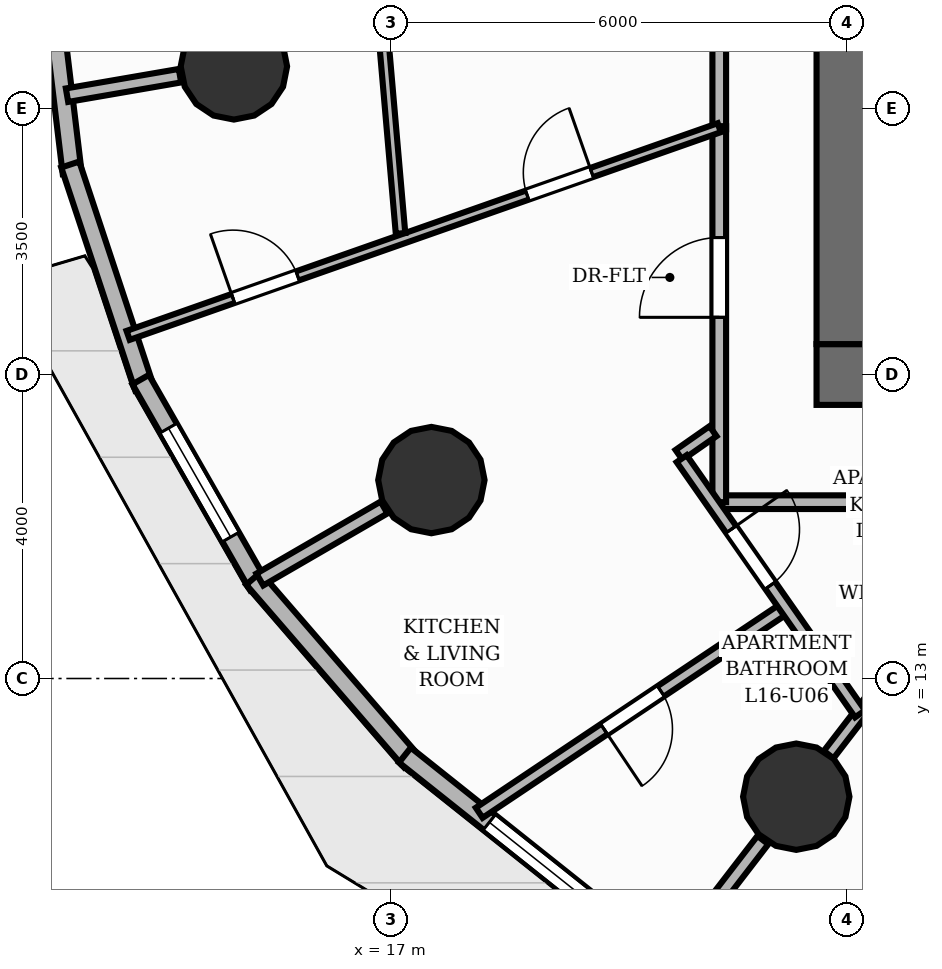
"""IFC4 building model, lengths in metres.
Left out: names, types, materials, properties, quantities, classifications, styles, units other than length and angle.
Written with IfcOpenShell. Run it as: python <this file> out.ifc"""

import sys

from ifc_helpers import new_model, si_unit, direction, frame, frame_2d, origin, origin_2d, place, context, subcontext, project, spatial, rectangle, circle, extrude, element, fill, save


model = new_model("IFC4")
c1 = context("Model", 3, precision=1e-05, world=origin(), true_north=direction((0.0, 1.0)))
c2 = subcontext(c1, "Body", "Model", "MODEL_VIEW")
j1 = project(units=[si_unit("LENGTHUNIT", "METRE"), si_unit("PLANEANGLEUNIT", "RADIAN")], contexts=[c1])
p1 = place(None, origin())
s1 = spatial("IfcSite", under=j1, at=p1, CompositionType="ELEMENT")
p2 = place(p1, origin())
s2 = spatial("IfcBuilding", under=s1, at=p2, CompositionType="ELEMENT")
p3 = place(p2, frame((0.0, 0.0, 56.8)))
s3 = spatial("IfcBuildingStorey", under=s2, at=p3, CompositionType="ELEMENT", Elevation=56.8)
p4 = place(p3, frame((22.6, 17.0, 0.0), z_axis=(0.0, 0.0, 1.0), x_axis=(1.0, 0.0, 0.0)))
e1 = element("IfcWall", 1, at=p4, inside=s3, PredefinedType="SHEAR", context=c2, shape_type="SweptSolid", body=[
    extrude(rectangle(XDim=18.8, YDim=0.8, at=frame_2d((9.4, 0.0))), origin(), (0.0, 0.0, 1.0), 3.2),
])
p5 = place(p4, frame((5.9, 0.0, 0.0)))
e2 = element("IfcOpeningElement", 2, at=p5, cuts=e1, PredefinedType="OPENING", context=c2, shape_type="SweptSolid", body=[
    extrude(rectangle(XDim=1.1, YDim=2.15, at=frame_2d((0.55, 1.075))), frame((0.0, 0.41, 0.0), z_axis=(0.0, -1.0, 0.0), x_axis=(1.0, 0.0, 0.0)), (0.0, 0.0, 1.0), 0.82),
])
p6 = place(p4, frame((9.45, 0.0, 0.0)))
e3 = element("IfcOpeningElement", 3, at=p6, cuts=e1, PredefinedType="OPENING", context=c2, shape_type="SweptSolid", body=[
    extrude(rectangle(XDim=0.9, YDim=2.1, at=frame_2d((0.45, 1.05))), frame((0.0, 0.41, 0.0), z_axis=(0.0, -1.0, 0.0), x_axis=(1.0, 0.0, 0.0)), (0.0, 0.0, 1.0), 0.82),
])
p7 = place(p3, frame((23.0, 17.4, 0.0), z_axis=(0.0, 0.0, 1.0), x_axis=(0.0, 1.0, 0.0)))
e4 = element("IfcWall", 4, at=p7, inside=s3, PredefinedType="SHEAR", context=c2, shape_type="SweptSolid", body=[
    extrude(rectangle(XDim=13.2, YDim=0.8, at=frame_2d((6.6, 0.0))), origin(), (0.0, 0.0, 1.0), 3.2),
])
for number, where, z_axis, x_axis in (
    (5, (14.934, 21.054, 0.0), (0.0, 0.0, 1.0), (1.0, 0.0, 0.0)),
    (6, (17.532, 15.611, 0.0), (0.0, 0.0, 1.0), (1.0, 0.0, 0.0)),
    (7, (22.333, 11.445, 0.0), (0.0, 0.0, 1.0), (1.0, 0.0, 0.0)),
):
    element("IfcColumn", number, at=place(p3, frame(where, z_axis=z_axis, x_axis=x_axis)), inside=s3, PredefinedType="COLUMN", context=c2, shape_type="SweptSolid", body=[
        extrude(circle(Radius=0.7, at=origin_2d()), origin(), (0.0, 0.0, 1.0), 3.2),
    ])
p8 = place(p3, frame((12.806, 19.651, 0.0), z_axis=(0.0, 0.0, 1.0), x_axis=(-0.119310240224, 0.992857022223, 0.0)))
e8 = element("IfcWall", 8, at=p8, inside=s3, PredefinedType="SOLIDWALL", context=c2, shape_type="SweptSolid", body=[
    extrude(rectangle(XDim=3.092, YDim=0.25, at=frame_2d((1.546, 0.0))), origin(), (0.0, 0.0, 1.0), 2.96),
])
p9 = place(p3, frame((13.755, 16.828, 0.0), z_axis=(0.0, 0.0, 1.0), x_axis=(-0.314806164357, 0.949155982377, 0.0)))
e9 = element("IfcWall", 9, at=p9, inside=s3, PredefinedType="SOLIDWALL", context=c2, shape_type="SweptSolid", body=[
    extrude(rectangle(XDim=3.092, YDim=0.25, at=frame_2d((1.546, 0.0))), origin(), (0.0, 0.0, 1.0), 2.96),
])
p10 = place(p3, frame((15.256, 14.223, 0.0), z_axis=(0.0, 0.0, 1.0), x_axis=(-0.496155788519, 0.868233513243, 0.0)))
e10 = element("IfcWall", 10, at=p10, inside=s3, PredefinedType="SOLIDWALL", context=c2, shape_type="SweptSolid", body=[
    extrude(rectangle(XDim=3.121, YDim=0.25, at=frame_2d((1.56, 0.0))), origin(), (0.0, 0.0, 1.0), 2.96),
])
p11 = place(p10, frame((0.735, 0.0, 0.85)))
e11 = element("IfcOpeningElement", 11, at=p11, cuts=e10, PredefinedType="OPENING", context=c2, shape_type="SweptSolid", body=[
    extrude(rectangle(XDim=1.65, YDim=1.55, at=frame_2d((0.825, 0.775))), frame((0.0, 0.135, 0.0), z_axis=(0.0, -1.0, 0.0), x_axis=(1.0, 0.0, 0.0)), (0.0, 0.0, 1.0), 0.27),
])
p12 = place(p3, frame((17.266, 11.914, 0.0), z_axis=(0.0, 0.0, 1.0), x_axis=(-0.653770062489, 0.75669327035, 0.0)))
e12 = element("IfcWall", 12, at=p12, inside=s3, PredefinedType="SOLIDWALL", context=c2, shape_type="SweptSolid", body=[
    extrude(rectangle(XDim=3.174, YDim=0.25, at=frame_2d((1.587, 0.0))), origin(), (0.0, 0.0, 1.0), 2.96),
])
p13 = place(p3, frame((19.722, 9.971, 0.0), z_axis=(0.0, 0.0, 1.0), x_axis=(-0.78232767864, 0.622867083119, 0.0)))
e13 = element("IfcWall", 13, at=p13, inside=s3, PredefinedType="SOLIDWALL", context=c2, shape_type="SweptSolid", body=[
    extrude(rectangle(XDim=3.244, YDim=0.25, at=frame_2d((1.622, 0.0))), origin(), (0.0, 0.0, 1.0), 2.96),
])
p14 = place(p13, frame((0.175, 0.0, 0.85)))
e14 = element("IfcOpeningElement", 14, at=p14, cuts=e13, PredefinedType="OPENING", context=c2, shape_type="SweptSolid", body=[
    extrude(rectangle(XDim=1.65, YDim=1.55, at=frame_2d((0.825, 0.775))), frame((0.0, 0.135, 0.0), z_axis=(0.0, -1.0, 0.0), x_axis=(1.0, 0.0, 0.0)), (0.0, 0.0, 1.0), 0.27),
])
p15 = place(p3, frame((14.225, 20.932, 0.0), z_axis=(0.0, 0.0, 1.0), x_axis=(-0.985418960314, -0.170145445587, 0.0)))
e15 = element("IfcWall", 15, at=p15, inside=s3, PredefinedType="PARTITIONING", context=c2, shape_type="SweptSolid", body=[
    extrude(rectangle(XDim=1.508, YDim=0.18, at=frame_2d((0.754, 0.0))), origin(), (0.0, 0.0, 1.0), 2.178),
])
p16 = place(p3, frame((16.909, 15.25, 0.0), z_axis=(0.0, 0.0, 1.0), x_axis=(-0.865027823723, -0.501723892379, 0.0)))
e16 = element("IfcWall", 16, at=p16, inside=s3, PredefinedType="PARTITIONING", context=c2, shape_type="SweptSolid", body=[
    extrude(rectangle(XDim=1.889, YDim=0.18, at=frame_2d((0.944, 0.0))), origin(), (0.0, 0.0, 1.0), 2.178),
])
p17 = place(p3, frame((21.894, 10.874, 0.0), z_axis=(0.0, 0.0, 1.0), x_axis=(-0.61002145357, -0.792384897752, 0.0)))
e17 = element("IfcWall", 17, at=p17, inside=s3, PredefinedType="PARTITIONING", context=c2, shape_type="SweptSolid", body=[
    extrude(rectangle(XDim=1.785, YDim=0.18, at=frame_2d((0.892, 0.0))), origin(), (0.0, 0.0, 1.0), 2.178),
])
p18 = place(p3, frame((28.852, 15.32, 0.0), z_axis=(0.0, 0.0, 1.0), x_axis=(-1.0, 0.0, 0.0)))
e18 = element("IfcWall", 18, at=p18, inside=s3, PredefinedType="PARTITIONING", context=c2, shape_type="SweptSolid", body=[
    extrude(rectangle(XDim=7.532, YDim=0.18, at=frame_2d((3.766, 0.0))), origin(), (0.0, 0.0, 1.0), 2.955),
])
p19 = place(p18, frame((1.33, 0.0, 0.0)))
e19 = element("IfcOpeningElement", 19, at=p19, cuts=e18, PredefinedType="OPENING", context=c2, shape_type="SweptSolid", body=[
    extrude(rectangle(XDim=0.9, YDim=2.1, at=frame_2d((0.45, 1.05))), frame((0.0, 0.1, 0.0), z_axis=(0.0, -1.0, 0.0), x_axis=(1.0, 0.0, 0.0)), (0.0, 0.0, 1.0), 0.2),
])
p20 = place(p3, frame((21.32, 20.226, 0.0), z_axis=(0.0, 0.0, 1.0), x_axis=(0.0, 1.0, 0.0)))
e20 = element("IfcWall", 20, at=p20, inside=s3, PredefinedType="PARTITIONING", context=c2, shape_type="SweptSolid", body=[
    extrude(rectangle(XDim=12.454, YDim=0.18, at=frame_2d((6.227, 0.0))), origin(), (0.0, 0.0, 1.0), 2.955),
])
p21 = place(p20, frame((9.711, 0.0, 0.0)))
e21 = element("IfcOpeningElement", 21, at=p21, cuts=e20, PredefinedType="OPENING", context=c2, shape_type="SweptSolid", body=[
    extrude(rectangle(XDim=1.05, YDim=2.15, at=frame_2d((0.525, 1.075))), frame((0.0, 0.1, 0.0), z_axis=(0.0, -1.0, 0.0), x_axis=(1.0, 0.0, 0.0)), (0.0, 0.0, 1.0), 0.2),
])
p22 = place(p3, frame((21.32, 15.32, 0.0), z_axis=(0.0, 0.0, 1.0), x_axis=(0.0, 1.0, 0.0)))
e22 = element("IfcWall", 22, at=p22, inside=s3, PredefinedType="PARTITIONING", context=c2, shape_type="SweptSolid", body=[
    extrude(rectangle(XDim=4.947, YDim=0.18, at=frame_2d((2.474, 0.0))), origin(), (0.0, 0.0, 1.0), 2.955),
])
p23 = place(p22, frame((2.432, 0.0, 0.0)))
e23 = element("IfcOpeningElement", 23, at=p23, cuts=e22, PredefinedType="OPENING", context=c2, shape_type="SweptSolid", body=[
    extrude(rectangle(XDim=1.05, YDim=2.15, at=frame_2d((0.525, 1.075))), frame((0.0, 0.1, 0.0), z_axis=(0.0, -1.0, 0.0), x_axis=(1.0, 0.0, 0.0)), (0.0, 0.0, 1.0), 0.2),
])
p24 = place(p3, frame((22.759, 11.998, 0.0), z_axis=(0.0, 0.0, 1.0), x_axis=(0.60996965366, 0.792424773473, 0.0)))
e24 = element("IfcWall", 24, at=p24, inside=s3, PredefinedType="PLUMBINGWALL", context=c2, shape_type="SweptSolid", body=[
    extrude(rectangle(XDim=4.192, YDim=0.16, at=frame_2d((2.096, 0.0))), origin(), (0.0, 0.0, 1.0), 2.178),
])
p25 = place(p3, frame((22.195, 13.933, 0.0), z_axis=(0.0, 0.0, 1.0), x_axis=(-0.831027380647, -0.556231509908, 0.0)))
e25 = element("IfcWall", 25, at=p25, inside=s3, PredefinedType="PLUMBINGWALL", context=c2, shape_type="SweptSolid", body=[
    extrude(rectangle(XDim=4.854, YDim=0.16, at=frame_2d((2.427, 0.0))), origin(), (0.0, 0.0, 1.0), 2.641),
])
p26 = place(p25, frame((1.977, 0.0, 0.0)))
e26 = element("IfcOpeningElement", 26, at=p26, cuts=e25, PredefinedType="OPENING", context=c2, shape_type="SweptSolid", body=[
    extrude(rectangle(XDim=0.9, YDim=2.1, at=frame_2d((0.45, 1.05))), frame((0.0, 0.09, 0.0), z_axis=(0.0, -1.0, 0.0), x_axis=(1.0, 0.0, 0.0)), (0.0, 0.0, 1.0), 0.18),
])
p27 = place(p3, frame((13.543, 17.515, 0.0), z_axis=(0.0, 0.0, 1.0), x_axis=(0.943466147543, 0.331468895131, 0.0)))
e27 = element("IfcWall", 27, at=p27, inside=s3, PredefinedType="PARTITIONING", context=c2, shape_type="SweptSolid", body=[
    extrude(rectangle(XDim=8.243, YDim=0.125, at=frame_2d((4.122, 0.0))), origin(), (0.0, 0.0, 1.0), 2.955),
])
p28 = place(p27, frame((1.463, 0.0, 0.0)))
e28 = element("IfcOpeningElement", 28, at=p28, cuts=e27, PredefinedType="OPENING", context=c2, shape_type="SweptSolid", body=[
    extrude(rectangle(XDim=0.9, YDim=2.1, at=frame_2d((0.45, 1.05))), frame((0.0, 0.073, 0.0), z_axis=(0.0, -1.0, 0.0), x_axis=(1.0, 0.0, 0.0)), (0.0, 0.0, 1.0), 0.145),
])
p29 = place(p27, frame((5.565, 0.0, 0.0)))
e29 = element("IfcOpeningElement", 29, at=p29, cuts=e27, PredefinedType="OPENING", context=c2, shape_type="SweptSolid", body=[
    extrude(rectangle(XDim=0.9, YDim=2.1, at=frame_2d((0.45, 1.05))), frame((0.0, 0.073, 0.0), z_axis=(0.0, -1.0, 0.0), x_axis=(1.0, 0.0, 0.0)), (0.0, 0.0, 1.0), 0.145),
])
p30 = place(p3, frame((21.238, 16.254, 0.0), z_axis=(0.0, 0.0, 1.0), x_axis=(-0.819589255208, -0.572951527398, 0.0)))
e30 = element("IfcWall", 30, at=p30, inside=s3, PredefinedType="PLUMBINGWALL", context=c2, shape_type="SweptSolid", body=[
    extrude(rectangle(XDim=0.545, YDim=0.16, at=frame_2d((0.273, 0.0))), origin(), (0.0, 0.0, 1.0), 2.955),
])
p31 = place(p3, frame((20.825, 15.893, 0.0), z_axis=(0.0, 0.0, 1.0), x_axis=(0.572966263624, -0.819578953334, 0.0)))
e31 = element("IfcWall", 31, at=p31, inside=s3, PredefinedType="PLUMBINGWALL", context=c2, shape_type="SweptSolid", body=[
    extrude(rectangle(XDim=4.096, YDim=0.16, at=frame_2d((2.048, 0.0))), origin(), (0.0, 0.0, 1.0), 2.955),
])
p32 = place(p31, frame((1.135, 0.0, 0.0)))
e32 = element("IfcOpeningElement", 32, at=p32, cuts=e31, PredefinedType="OPENING", context=c2, shape_type="SweptSolid", body=[
    extrude(rectangle(XDim=0.9, YDim=2.1, at=frame_2d((0.45, 1.05))), frame((0.0, 0.09, 0.0), z_axis=(0.0, -1.0, 0.0), x_axis=(1.0, 0.0, 0.0)), (0.0, 0.0, 1.0), 0.18),
])
p33 = place(p3, frame((16.455, 26.605, 0.0), z_axis=(0.0, 0.0, 1.0), x_axis=(0.086414248462, -0.996259292385, 0.0)))
e33 = element("IfcWall", 33, at=p33, inside=s3, PredefinedType="PARTITIONING", context=c2, shape_type="SweptSolid", body=[
    extrude(rectangle(XDim=7.778, YDim=0.125, at=frame_2d((3.889, 0.0))), origin(), (0.0, 0.0, 1.0), 2.955),
])
p34 = place(p11, origin())
e34 = element("IfcWindow", 34, at=p34, inside=s3, PartitioningType="SINGLE_PANEL", PredefinedType="WINDOW", context=c2, shape_type="SweptSolid", body=[
    extrude(rectangle(XDim=1.65, YDim=1.55, at=frame_2d((0.825, 0.775))), frame((0.0, 0.03, 0.0), z_axis=(0.0, -1.0, 0.0), x_axis=(1.0, 0.0, 0.0)), (0.0, 0.0, 1.0), 0.06),
])
fill(e11, e34)
p35 = place(p14, origin())
e35 = element("IfcWindow", 35, at=p35, inside=s3, PartitioningType="SINGLE_PANEL", PredefinedType="WINDOW", context=c2, shape_type="SweptSolid", body=[
    extrude(rectangle(XDim=1.65, YDim=1.55, at=frame_2d((0.825, 0.775))), frame((0.0, 0.03, 0.0), z_axis=(0.0, -1.0, 0.0), x_axis=(1.0, 0.0, 0.0)), (0.0, 0.0, 1.0), 0.06),
])
fill(e14, e35)
p36 = place(p23, origin())
e36 = element("IfcDoor", 36, at=p36, inside=s3, OperationType="SINGLE_SWING_LEFT", PredefinedType="DOOR", context=c2, shape_type="SweptSolid", body=[
    extrude(rectangle(XDim=1.05, YDim=2.15, at=frame_2d((0.525, 1.075))), frame((0.0, 0.025, 0.0), z_axis=(0.0, -1.0, 0.0), x_axis=(1.0, 0.0, 0.0)), (0.0, 0.0, 1.0), 0.05),
])
fill(e23, e36)
p37 = place(p26, origin())
e37 = element("IfcDoor", 37, at=p37, inside=s3, OperationType="SINGLE_SWING_RIGHT", PredefinedType="DOOR", context=c2, shape_type="SweptSolid", body=[
    extrude(rectangle(XDim=0.9, YDim=2.1, at=frame_2d((0.45, 1.05))), frame((0.0, 0.025, 0.0), z_axis=(0.0, -1.0, 0.0), x_axis=(1.0, 0.0, 0.0)), (0.0, 0.0, 1.0), 0.05),
])
fill(e26, e37)
p38 = place(p28, origin())
e38 = element("IfcDoor", 38, at=p38, inside=s3, OperationType="SINGLE_SWING_LEFT", PredefinedType="DOOR", context=c2, shape_type="SweptSolid", body=[
    extrude(rectangle(XDim=0.9, YDim=2.1, at=frame_2d((0.45, 1.05))), frame((0.0, 0.025, 0.0), z_axis=(0.0, -1.0, 0.0), x_axis=(1.0, 0.0, 0.0)), (0.0, 0.0, 1.0), 0.05),
])
fill(e28, e38)
p39 = place(p29, origin())
e39 = element("IfcDoor", 39, at=p39, inside=s3, OperationType="SINGLE_SWING_RIGHT", PredefinedType="DOOR", context=c2, shape_type="SweptSolid", body=[
    extrude(rectangle(XDim=0.9, YDim=2.1, at=frame_2d((0.45, 1.05))), frame((0.0, 0.025, 0.0), z_axis=(0.0, -1.0, 0.0), x_axis=(1.0, 0.0, 0.0)), (0.0, 0.0, 1.0), 0.05),
])
fill(e29, e39)
p40 = place(p32, origin())
e40 = element("IfcDoor", 40, at=p40, inside=s3, OperationType="SINGLE_SWING_LEFT", PredefinedType="DOOR", context=c2, shape_type="SweptSolid", body=[
    extrude(rectangle(XDim=0.9, YDim=2.1, at=frame_2d((0.45, 1.05))), frame((0.0, 0.025, 0.0), z_axis=(0.0, -1.0, 0.0), x_axis=(1.0, 0.0, 0.0)), (0.0, 0.0, 1.0), 0.05),
])
fill(e32, e40)
save(model, sys.argv[1])
